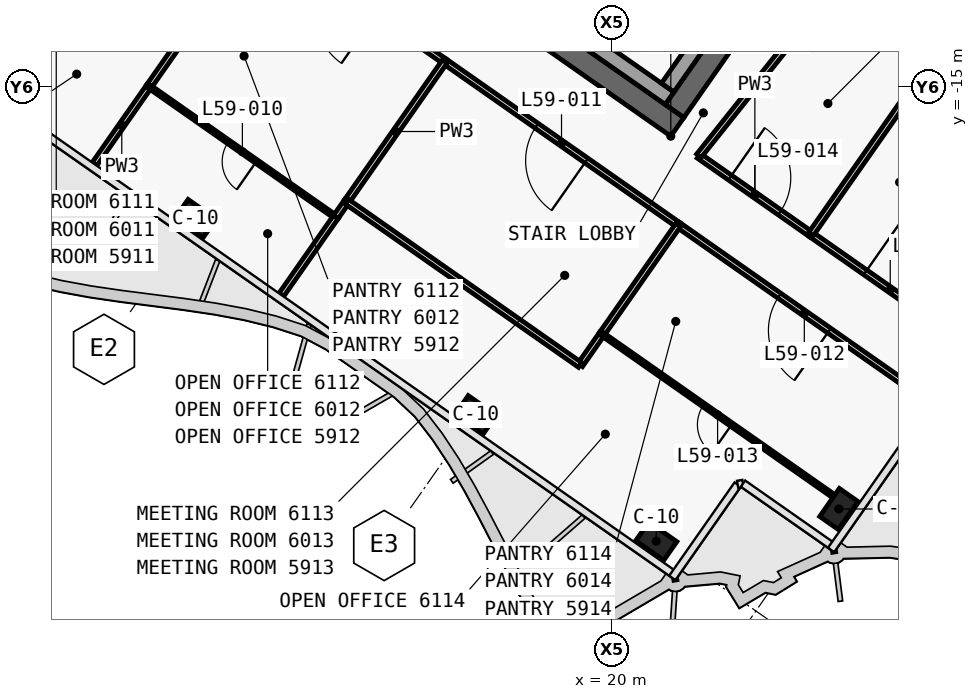
"""IFC4 building model, lengths in metres.
Left out: names, types, materials, properties, quantities, classifications, styles, units other than length and angle.
Written with IfcOpenShell. Run it as: python <this file> out.ifc"""

import sys

from ifc_helpers import new_model, si_unit, direction, frame, frame_2d, origin, origin_2d, place, context, subcontext, project, spatial, polyline, rectangle, outline, extrude, element, fill, save


model = new_model("IFC4")
c1 = context("Model", 3, precision=1e-05, world=origin(), true_north=direction((0.0, 1.0)))
c2 = subcontext(c1, "Body", "Model", "MODEL_VIEW")
j1 = project(units=[si_unit("LENGTHUNIT", "METRE"), si_unit("PLANEANGLEUNIT", "RADIAN")], contexts=[c1])
p1 = place(None, origin())
s1 = spatial("IfcSite", under=j1, at=p1, CompositionType="ELEMENT")
p2 = place(p1, origin())
s2 = spatial("IfcBuilding", under=s1, at=p2, CompositionType="ELEMENT")
p3 = place(p2, frame((0.0, 0.0, 252.7)))
s3 = spatial("IfcBuildingStorey", under=s2, at=p3, CompositionType="ELEMENT", Elevation=252.7)
p4 = place(p3, frame((0.028, -0.874, 0.0), z_axis=(0.0, 0.0, 1.0), x_axis=(0.819150035022, -0.573579305871, 0.0)))
e1 = element("IfcWall", 1, at=p4, inside=s3, PredefinedType="SHEAR", context=c2, shape_type="SweptSolid", body=[
    extrude(outline(polyline([(26.476, 0.3), (0.0, 0.3), (0.42, -0.3), (26.476, -0.3), (26.476, 0.3)])), origin(), (0.0, 0.0, 1.0), 3.9),
])
p5 = place(p4, frame((0.826, 0.0, 0.0)))
e2 = element("IfcOpeningElement", 2, at=p5, cuts=e1, PredefinedType="OPENING", context=c2, shape_type="SweptSolid", body=[
    extrude(rectangle(XDim=1.5, YDim=2.1, at=frame_2d((0.75, 1.05))), frame((0.0, 0.31, 0.0), z_axis=(0.0, -1.0, 0.0), x_axis=(1.0, 0.0, 0.0)), (0.0, 0.0, 1.0), 0.62),
])
p6 = place(p4, frame((12.226, 0.0, 0.0)))
e3 = element("IfcOpeningElement", 3, at=p6, cuts=e1, PredefinedType="OPENING", context=c2, shape_type="SweptSolid", body=[
    extrude(rectangle(XDim=1.5, YDim=2.1, at=frame_2d((0.75, 1.05))), frame((0.0, 0.31, 0.0), z_axis=(0.0, -1.0, 0.0), x_axis=(1.0, 0.0, 0.0)), (0.0, 0.0, 1.0), 0.62),
])
p7 = place(p3, frame((21.642, -15.642, 0.0), z_axis=(0.0, 0.0, 1.0), x_axis=(0.573586866468, 0.819144740944, 0.0)))
e4 = element("IfcWall", 4, at=p7, inside=s3, PredefinedType="SHEAR", context=c2, shape_type="SweptSolid", body=[
    extrude(outline(polyline([(10.0, 0.3), (0.0, 0.3), (0.0, -0.3), (10.0, -0.3), (10.0, 0.3)])), origin(), (0.0, 0.0, 1.0), 3.9),
])
p8 = place(p7, frame((6.5, 0.0, 0.0)))
e5 = element("IfcOpeningElement", 5, at=p8, cuts=e4, PredefinedType="OPENING", context=c2, shape_type="SweptSolid", body=[
    extrude(rectangle(XDim=1.8, YDim=2.1, at=frame_2d((0.9, 1.05))), frame((0.0, 0.31, 0.0), z_axis=(0.0, -1.0, 0.0), x_axis=(1.0, 0.0, 0.0)), (0.0, 0.0, 1.0), 0.62),
])
p9 = place(p7, frame((2.3, 0.0, 0.0)))
e6 = element("IfcOpeningElement", 6, at=p9, cuts=e4, PredefinedType="OPENING", context=c2, shape_type="SweptSolid", body=[
    extrude(rectangle(XDim=1.8, YDim=2.1, at=frame_2d((0.9, 1.05))), frame((0.0, 0.31, 0.0), z_axis=(0.0, -1.0, 0.0), x_axis=(1.0, 0.0, 0.0)), (0.0, 0.0, 1.0), 0.62),
])
for number, where, z_axis, x_axis in (
    (7, (9.038, -18.475, 0.0), (0.0, 0.0, 1.0), (0.819, -0.574, 0.0)),
    (8, (16.41, -23.637, 0.0), (0.0, 0.0, 1.0), (0.819, -0.574, 0.0)),
    (9, (21.161, -26.964, 0.0), (0.0, 0.0, 1.0), (0.819, -0.574, 0.0)),
    (10, (25.966, -26.117, 0.0), (0.0, 0.0, 1.0), (0.574, 0.819, 0.0)),
):
    element("IfcColumn", number, at=place(p3, frame(where, z_axis=z_axis, x_axis=x_axis)), inside=s3, PredefinedType="COLUMN", context=c2, shape_type="SweptSolid", body=[
        extrude(rectangle(XDim=0.9, YDim=0.6, at=origin_2d()), origin(), (0.0, 0.0, 1.0), 3.9),
    ])
p10 = place(p3, frame((14.753, -10.574, 0.0), z_axis=(0.0, 0.0, 1.0), x_axis=(0.819158229677, -0.573567602601, 0.0)))
e11 = element("IfcWall", 11, at=p10, inside=s3, PredefinedType="SOLIDWALL", context=c2, shape_type="SweptSolid", body=[
    extrude(rectangle(XDim=8.25, YDim=0.4, at=frame_2d((4.125, 0.0))), origin(), (0.0, 0.0, 1.0), 3.62),
])
p11 = place(p3, frame((21.462, -15.028, 0.0), z_axis=(0.0, 0.0, 1.0), x_axis=(0.573559770908, 0.819163713305, 0.0)))
e12 = element("IfcWall", 12, at=p11, inside=s3, PredefinedType="SOLIDWALL", context=c2, shape_type="SweptSolid", body=[
    extrude(rectangle(XDim=1.85, YDim=0.4, at=frame_2d((0.925, 0.0))), origin(), (0.0, 0.0, 1.0), 3.62),
])
p12 = place(p3, frame((22.281, -16.822, 0.0), z_axis=(0.0, 0.0, 1.0), x_axis=(0.819165052243, -0.573557858619, 0.0)))
e13 = element("IfcWall", 13, at=p12, inside=s3, PredefinedType="PARTITIONING", context=c2, shape_type="SweptSolid", body=[
    extrude(rectangle(XDim=3.602, YDim=0.15, at=frame_2d((1.801, 0.0))), origin(), (0.0, 0.0, 1.0), 3.62),
])
p13 = place(p12, frame((1.001, 0.0, 0.0)))
e14 = element("IfcOpeningElement", 14, at=p13, cuts=e13, PredefinedType="OPENING", context=c2, shape_type="SweptSolid", body=[
    extrude(rectangle(XDim=1.6, YDim=2.1, at=frame_2d((0.8, 1.05))), frame((0.0, 0.085, 0.0), z_axis=(0.0, -1.0, 0.0), x_axis=(1.0, 0.0, 0.0)), (0.0, 0.0, 1.0), 0.17),
])
p14 = place(p3, frame((25.228, -18.886, 0.0), z_axis=(0.0, 0.0, 1.0), x_axis=(0.819171218287, -0.57354905207, 0.0)))
e15 = element("IfcWall", 15, at=p14, inside=s3, PredefinedType="PARTITIONING", context=c2, shape_type="SweptSolid", body=[
    extrude(rectangle(XDim=5.102, YDim=0.15, at=frame_2d((2.551, 0.0))), origin(), (0.0, 0.0, 1.0), 3.0),
])
p15 = place(p14, frame((1.751, 0.0, 0.0)))
e16 = element("IfcOpeningElement", 16, at=p15, cuts=e15, PredefinedType="OPENING", context=c2, shape_type="SweptSolid", body=[
    extrude(rectangle(XDim=1.6, YDim=2.1, at=frame_2d((0.8, 1.05))), frame((0.0, 0.085, 0.0), z_axis=(0.0, -1.0, 0.0), x_axis=(1.0, 0.0, 0.0)), (0.0, 0.0, 1.0), 0.17),
])
p16 = place(p3, frame((15.598, -14.34, 0.0), z_axis=(0.0, 0.0, 1.0), x_axis=(-0.819145946981, 0.573585144111, 0.0)))
e17 = element("IfcWall", 17, at=p16, inside=s3, PredefinedType="PARTITIONING", context=c2, shape_type="SweptSolid", body=[
    extrude(rectangle(XDim=6.004, YDim=0.15, at=frame_2d((3.002, 0.0))), origin(), (0.0, 0.0, 1.0), 3.05),
])
p17 = place(p16, frame((2.202, 0.0, 0.0)))
e18 = element("IfcOpeningElement", 18, at=p17, cuts=e17, PredefinedType="OPENING", context=c2, shape_type="SweptSolid", body=[
    extrude(rectangle(XDim=1.6, YDim=2.1, at=frame_2d((0.8, 1.05))), frame((0.0, 0.085, 0.0), z_axis=(0.0, -1.0, 0.0), x_axis=(1.0, 0.0, 0.0)), (0.0, 0.0, 1.0), 0.17),
])
p18 = place(p3, frame((21.741, -18.642, 0.0), z_axis=(0.0, 0.0, 1.0), x_axis=(-0.819164661457, 0.573558416746, 0.0)))
e19 = element("IfcWall", 19, at=p18, inside=s3, PredefinedType="PARTITIONING", context=c2, shape_type="SweptSolid", body=[
    extrude(rectangle(XDim=7.504, YDim=0.15, at=frame_2d((3.752, 0.0))), origin(), (0.0, 0.0, 1.0), 3.05),
])
p19 = place(p18, frame((2.952, 0.0, 0.0)))
e20 = element("IfcOpeningElement", 20, at=p19, cuts=e19, PredefinedType="OPENING", context=c2, shape_type="SweptSolid", body=[
    extrude(rectangle(XDim=1.6, YDim=2.1, at=frame_2d((0.8, 1.05))), frame((0.0, 0.085, 0.0), z_axis=(0.0, -1.0, 0.0), x_axis=(1.0, 0.0, 0.0)), (0.0, 0.0, 1.0), 0.17),
])
p20 = place(p3, frame((28.375, -23.287, 0.0), z_axis=(0.0, 0.0, 1.0), x_axis=(-0.819144140048, 0.573587724611, 0.0)))
e21 = element("IfcWall", 21, at=p20, inside=s3, PredefinedType="PARTITIONING", context=c2, shape_type="SweptSolid", body=[
    extrude(rectangle(XDim=8.102, YDim=0.15, at=frame_2d((4.051, 0.0))), origin(), (0.0, 0.0, 1.0), 3.0),
])
p21 = place(p20, frame((3.251, 0.0, 0.0)))
e22 = element("IfcOpeningElement", 22, at=p21, cuts=e21, PredefinedType="OPENING", context=c2, shape_type="SweptSolid", body=[
    extrude(rectangle(XDim=1.6, YDim=2.1, at=frame_2d((0.8, 1.05))), frame((0.0, 0.085, 0.0), z_axis=(0.0, -1.0, 0.0), x_axis=(1.0, 0.0, 0.0)), (0.0, 0.0, 1.0), 0.17),
])
p22 = place(p3, frame((28.499, -14.218, 0.0), z_axis=(0.0, 0.0, 1.0), x_axis=(-0.573562952056, -0.819161485929, 0.0)))
e23 = element("IfcWall", 23, at=p22, inside=s3, PredefinedType="PARTITIONING", context=c2, shape_type="SweptSolid", body=[
    extrude(rectangle(XDim=5.7, YDim=0.15, at=frame_2d((2.85, 0.0))), origin(), (0.0, 0.0, 1.0), 3.05),
])
p23 = place(p3, frame((22.282, -16.823, 0.0), z_axis=(0.0, 0.0, 1.0), x_axis=(0.623563137477, 0.781772993637, 0.0)))
e24 = element("IfcWall", 24, at=p23, inside=s3, PredefinedType="PARTITIONING", context=c2, shape_type="SweptSolid", body=[
    extrude(rectangle(XDim=5.711, YDim=0.15, at=frame_2d((2.855, 0.0))), origin(), (0.0, 0.0, 1.0), 3.05),
])
p24 = place(p3, frame((7.814, -14.992, 0.0), z_axis=(0.0, 0.0, 1.0), x_axis=(-0.57356715775, -0.819158541157, 0.0)))
e25 = element("IfcWall", 25, at=p24, inside=s3, PredefinedType="PARTITIONING", context=c2, shape_type="SweptSolid", body=[
    extrude(rectangle(XDim=2.501, YDim=0.15, at=frame_2d((1.25, 0.0))), origin(), (0.0, 0.0, 1.0), 3.0),
])
p25 = place(p3, frame((8.673, -13.765, 0.0), z_axis=(0.0, 0.0, 1.0), x_axis=(-0.573549676934, -0.819170780783, 0.0)))
e26 = element("IfcWall", 26, at=p25, inside=s3, PredefinedType="PARTITIONING", context=c2, shape_type="SweptSolid", body=[
    extrude(rectangle(XDim=1.501, YDim=0.15, at=frame_2d((0.75, 0.0))), origin(), (0.0, 0.0, 1.0), 3.62),
])
p26 = place(p3, frame((12.728, -18.435, 0.0), z_axis=(0.0, 0.0, 1.0), x_axis=(-0.819163097304, 0.573560650686, 0.0)))
e27 = element("IfcWall", 27, at=p26, inside=s3, PredefinedType="PARTITIONING", context=c2, shape_type="SweptSolid", body=[
    extrude(rectangle(XDim=6.0, YDim=0.1, at=frame_2d((3.0, 0.0))), origin(), (0.0, 0.0, 1.0), 3.05),
])
p27 = place(p26, frame((2.55, 0.0, 0.0)))
e28 = element("IfcOpeningElement", 28, at=p27, cuts=e27, PredefinedType="OPENING", context=c2, shape_type="SweptSolid", body=[
    extrude(rectangle(XDim=0.9, YDim=2.1, at=frame_2d((0.45, 1.05))), frame((0.0, 0.06, 0.0), z_axis=(0.0, -1.0, 0.0), x_axis=(1.0, 0.0, 0.0)), (0.0, 0.0, 1.0), 0.12),
])
p28 = place(p3, frame((12.728, -18.435, 0.0), z_axis=(0.0, 0.0, 1.0), x_axis=(-0.573560689761, -0.819163069945, 0.0)))
e29 = element("IfcWall", 29, at=p28, inside=s3, PredefinedType="PARTITIONING", context=c2, shape_type="SweptSolid", body=[
    extrude(rectangle(XDim=2.499, YDim=0.15, at=frame_2d((1.25, 0.0))), origin(), (0.0, 0.0, 1.0), 3.0),
])
p29 = place(p3, frame((15.596, -14.339, 0.0), z_axis=(0.0, 0.0, 1.0), x_axis=(-0.573564243949, -0.819160581365, 0.0)))
e30 = element("IfcWall", 30, at=p29, inside=s3, PredefinedType="PARTITIONING", context=c2, shape_type="SweptSolid", body=[
    extrude(rectangle(XDim=4.502, YDim=0.15, at=frame_2d((2.251, 0.0))), origin(), (0.0, 0.0, 1.0), 3.62),
])
p30 = place(p3, frame((13.016, -18.024, 0.0), z_axis=(0.0, 0.0, 1.0), x_axis=(-0.573560455774, -0.819163233777, 0.0)))
e31 = element("IfcWall", 31, at=p30, inside=s3, PredefinedType="PARTITIONING", context=c2, shape_type="SweptSolid", body=[
    extrude(rectangle(XDim=0.501, YDim=0.15, at=frame_2d((0.25, 0.0))), origin(), (0.0, 0.0, 1.0), 3.62),
])
p31 = place(p3, frame((19.733, -21.507, 0.0), z_axis=(0.0, 0.0, 1.0), x_axis=(-0.573691505171, -0.819071460188, 0.0)))
e32 = element("IfcWall", 32, at=p31, inside=s3, PredefinedType="PARTITIONING", context=c2, shape_type="SweptSolid", body=[
    extrude(rectangle(XDim=1.001, YDim=0.15, at=frame_2d((0.5, 0.0))), origin(), (0.0, 0.0, 1.0), 3.62),
])
p32 = place(p3, frame((19.159, -22.327, 0.0), z_axis=(0.0, 0.0, 1.0), x_axis=(-0.81915238829, 0.573575945067, 0.0)))
e33 = element("IfcWall", 33, at=p32, inside=s3, PredefinedType="PARTITIONING", context=c2, shape_type="SweptSolid", body=[
    extrude(rectangle(XDim=7.5, YDim=0.15, at=frame_2d((3.75, 0.0))), origin(), (0.0, 0.0, 1.0), 3.05),
])
p33 = place(p3, frame((21.74, -18.641, 0.0), z_axis=(0.0, 0.0, 1.0), x_axis=(-0.573555919535, -0.819166409935, 0.0)))
e34 = element("IfcWall", 34, at=p33, inside=s3, PredefinedType="PARTITIONING", context=c2, shape_type="SweptSolid", body=[
    extrude(rectangle(XDim=3.502, YDim=0.15, at=frame_2d((1.751, 0.0))), origin(), (0.0, 0.0, 1.0), 3.05),
])
p34 = place(p3, frame((25.818, -25.77, 0.0), z_axis=(0.0, 0.0, 1.0), x_axis=(-0.819154729426, 0.573572601559, 0.0)))
e35 = element("IfcWall", 35, at=p34, inside=s3, PredefinedType="PARTITIONING", context=c2, shape_type="SweptSolid", body=[
    extrude(rectangle(XDim=7.43, YDim=0.1, at=frame_2d((3.715, 0.0))), origin(), (0.0, 0.0, 1.0), 3.05),
])
p35 = place(p34, frame((3.265, 0.0, 0.0)))
e36 = element("IfcOpeningElement", 36, at=p35, cuts=e35, PredefinedType="OPENING", context=c2, shape_type="SweptSolid", body=[
    extrude(rectangle(XDim=0.9, YDim=2.1, at=frame_2d((0.45, 1.05))), frame((0.0, 0.06, 0.0), z_axis=(0.0, -1.0, 0.0), x_axis=(1.0, 0.0, 0.0)), (0.0, 0.0, 1.0), 0.12),
])
p36 = place(p27, origin())
e37 = element("IfcDoor", 37, at=p36, inside=s3, OperationType="SINGLE_SWING_RIGHT", PredefinedType="DOOR", context=c2, shape_type="SweptSolid", body=[
    extrude(rectangle(XDim=0.9, YDim=2.1, at=frame_2d((0.45, 1.05))), frame((0.0, 0.025, 0.0), z_axis=(0.0, -1.0, 0.0), x_axis=(1.0, 0.0, 0.0)), (0.0, 0.0, 1.0), 0.05),
])
fill(e28, e37)
p37 = place(p19, origin())
e38 = element("IfcDoor", 38, at=p37, inside=s3, OperationType="DOUBLE_DOOR_SINGLE_SWING", PredefinedType="DOOR", context=c2, shape_type="SweptSolid", body=[
    extrude(rectangle(XDim=1.6, YDim=2.1, at=frame_2d((0.8, 1.05))), frame((0.0, 0.025, 0.0), z_axis=(0.0, -1.0, 0.0), x_axis=(1.0, 0.0, 0.0)), (0.0, 0.0, 1.0), 0.05),
])
fill(e20, e38)
p38 = place(p21, origin())
e39 = element("IfcDoor", 39, at=p38, inside=s3, OperationType="DOUBLE_DOOR_SINGLE_SWING", PredefinedType="DOOR", context=c2, shape_type="SweptSolid", body=[
    extrude(rectangle(XDim=1.6, YDim=2.1, at=frame_2d((0.8, 1.05))), frame((0.0, 0.025, 0.0), z_axis=(0.0, -1.0, 0.0), x_axis=(1.0, 0.0, 0.0)), (0.0, 0.0, 1.0), 0.05),
])
fill(e22, e39)
p39 = place(p35, origin())
e40 = element("IfcDoor", 40, at=p39, inside=s3, OperationType="SINGLE_SWING_RIGHT", PredefinedType="DOOR", context=c2, shape_type="SweptSolid", body=[
    extrude(rectangle(XDim=0.9, YDim=2.1, at=frame_2d((0.45, 1.05))), frame((0.0, 0.025, 0.0), z_axis=(0.0, -1.0, 0.0), x_axis=(1.0, 0.0, 0.0)), (0.0, 0.0, 1.0), 0.05),
])
fill(e36, e40)
p40 = place(p13, origin())
e41 = element("IfcDoor", 41, at=p40, inside=s3, OperationType="DOUBLE_DOOR_SINGLE_SWING", PredefinedType="DOOR", context=c2, shape_type="SweptSolid", body=[
    extrude(rectangle(XDim=1.6, YDim=2.1, at=frame_2d((0.8, 1.05))), frame((0.0, 0.025, 0.0), z_axis=(0.0, -1.0, 0.0), x_axis=(1.0, 0.0, 0.0)), (0.0, 0.0, 1.0), 0.05),
])
fill(e14, e41)
p41 = place(p15, origin())
e42 = element("IfcDoor", 42, at=p41, inside=s3, OperationType="DOUBLE_DOOR_SINGLE_SWING", PredefinedType="DOOR", context=c2, shape_type="SweptSolid", body=[
    extrude(rectangle(XDim=1.6, YDim=2.1, at=frame_2d((0.8, 1.05))), frame((0.0, 0.025, 0.0), z_axis=(0.0, -1.0, 0.0), x_axis=(1.0, 0.0, 0.0)), (0.0, 0.0, 1.0), 0.05),
])
fill(e16, e42)
save(model, sys.argv[1])
